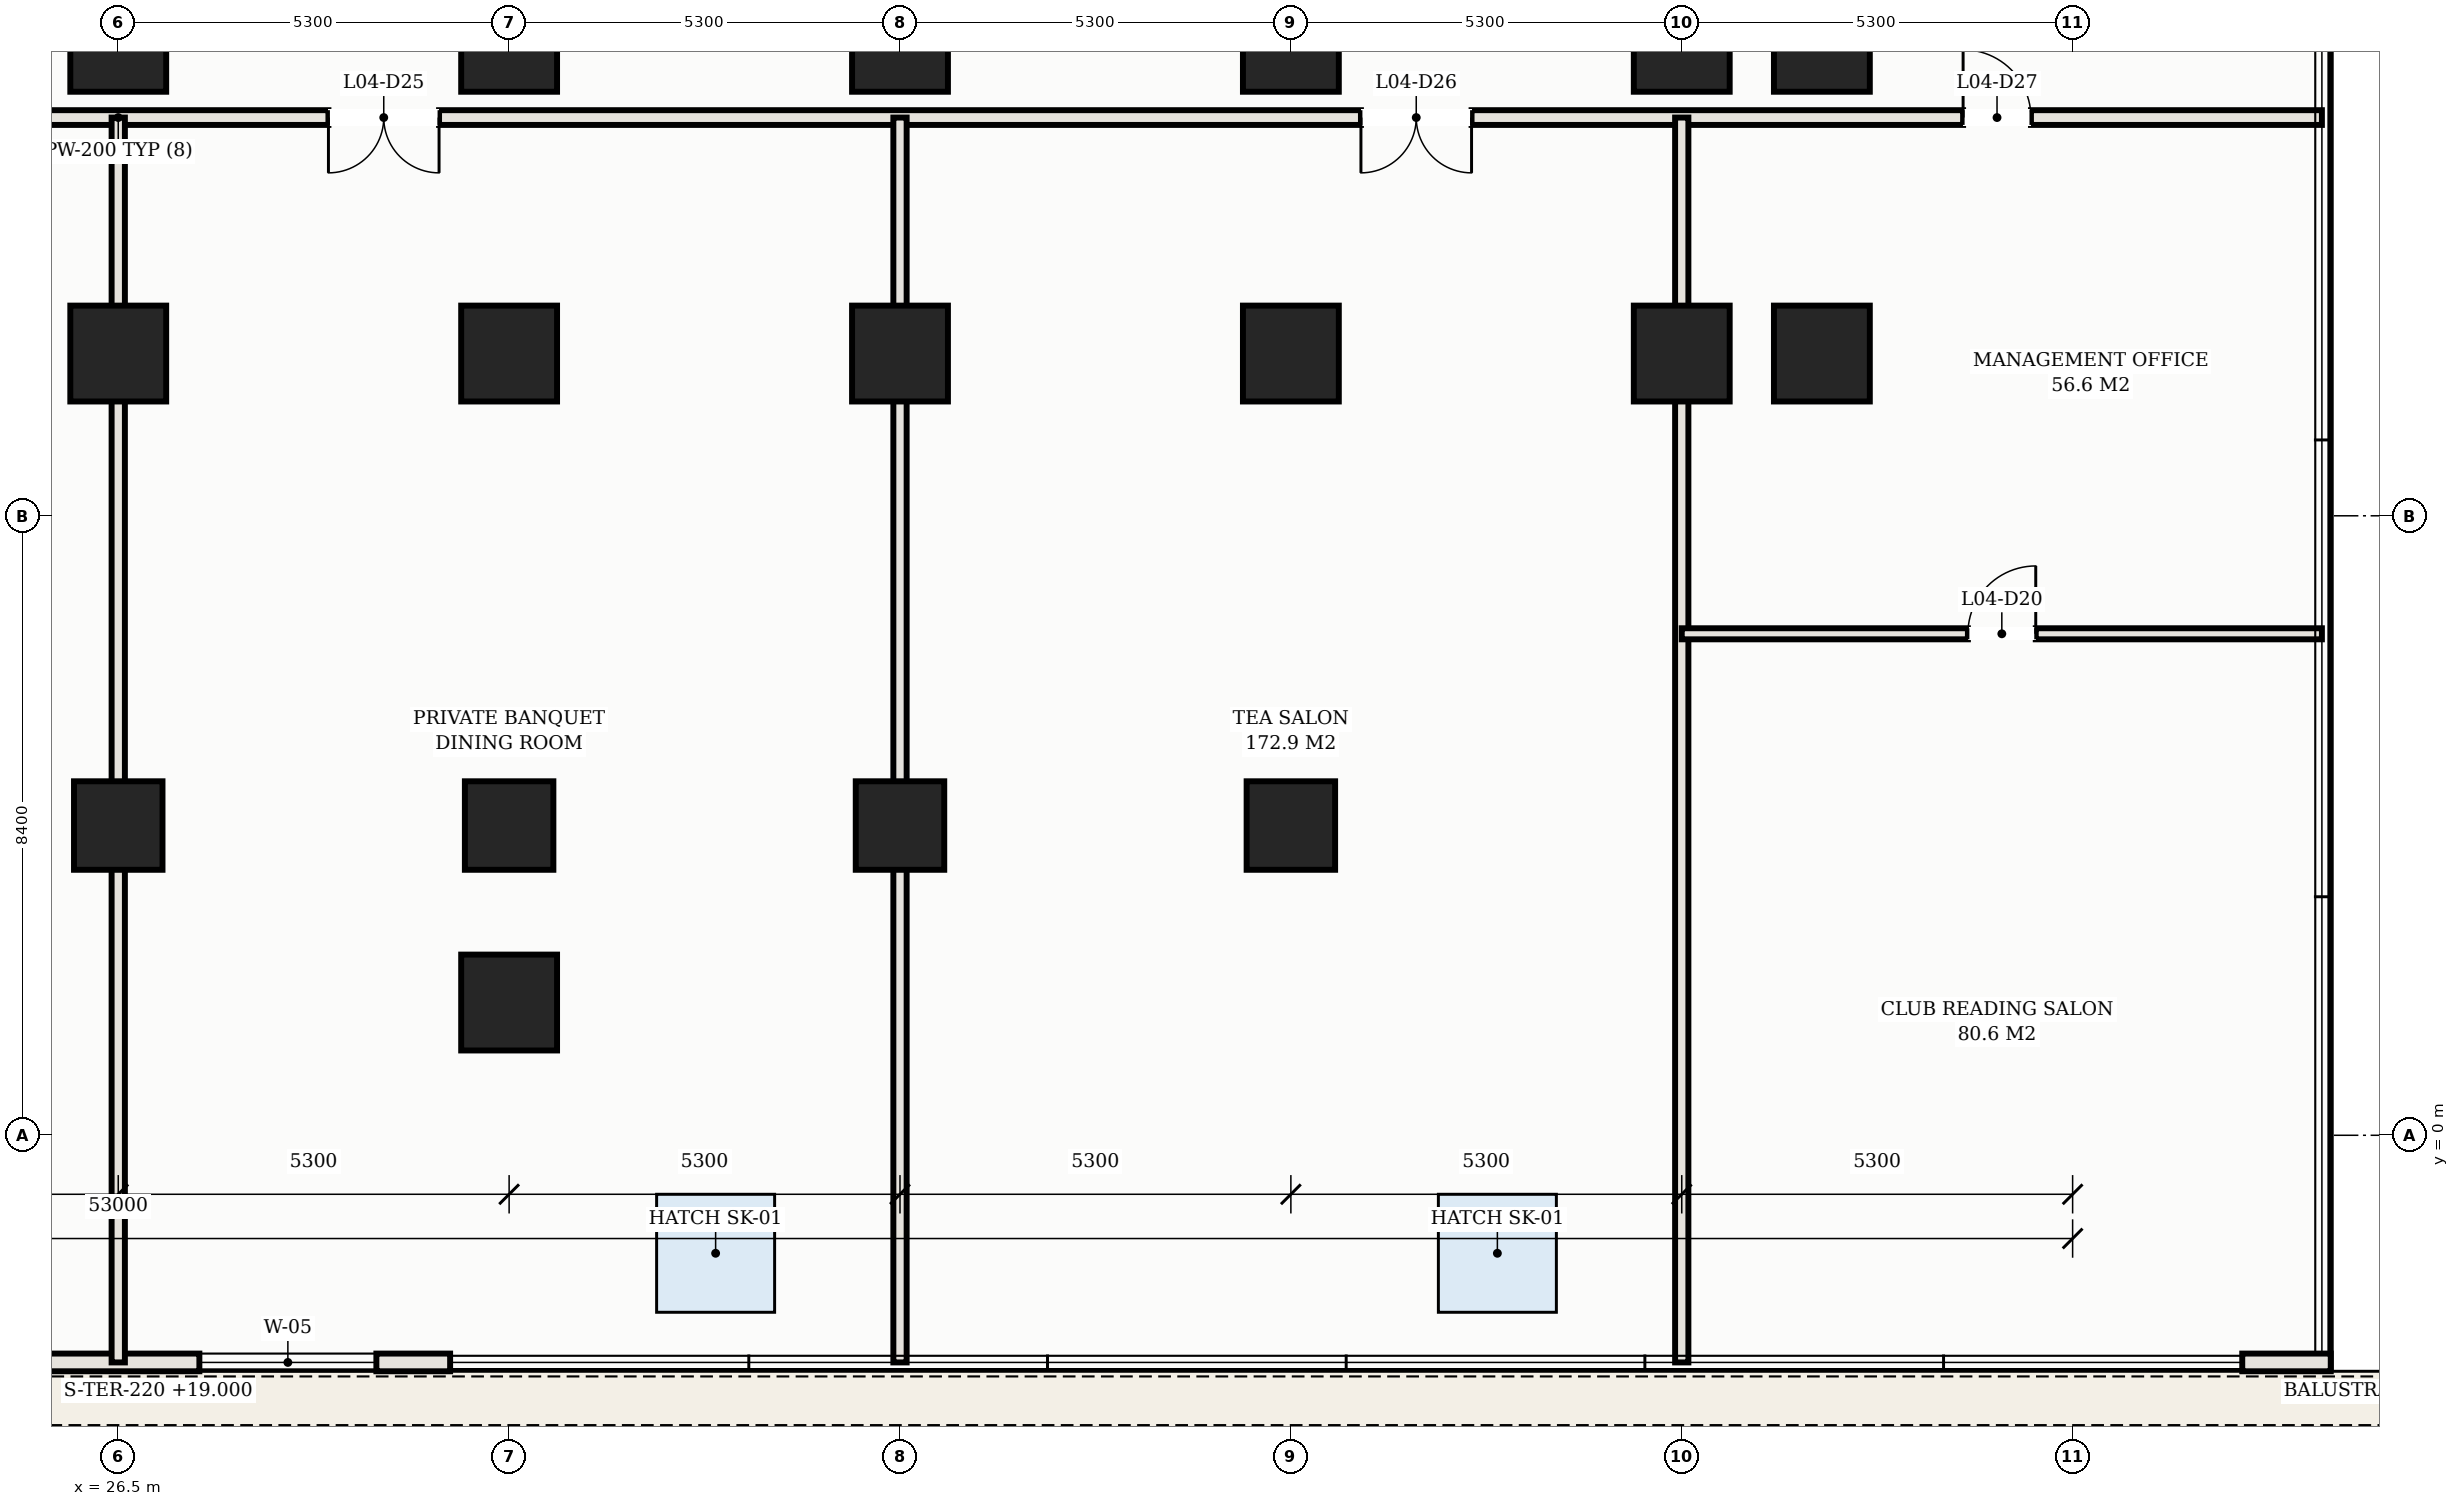
"""IFC4 building model, lengths in metres.
Left out: names, types, materials, properties, quantities, classifications, styles, units other than length and angle.
Written with IfcOpenShell. Run it as: python <this file> out.ifc"""

import sys

from ifc_helpers import new_model, si_unit, direction, frame, frame_2d, origin, origin_2d, place, context, subcontext, project, spatial, rectangle, hollow_rectangle, extrude, element, fill, save


model = new_model("IFC4")
c1 = context("Model", 3, precision=1e-05, world=origin(), true_north=direction((0.0, 1.0)))
c2 = subcontext(c1, "Body", "Model", "MODEL_VIEW")
j1 = project(units=[si_unit("LENGTHUNIT", "METRE"), si_unit("PLANEANGLEUNIT", "RADIAN")], contexts=[c1])
p1 = place(None, origin())
s1 = spatial("IfcSite", under=j1, at=p1, CompositionType="ELEMENT")
p2 = place(p1, origin())
s2 = spatial("IfcBuilding", under=s1, at=p2, CompositionType="ELEMENT")
p3 = place(p2, frame((0.0, 0.0, 19.0)))
s3 = spatial("IfcBuildingStorey", under=s2, at=p3, CompositionType="ELEMENT", Elevation=19.0)
for number, where, z_axis, x_axis in (
    (1, (31.8, 1.8, 0.0), (0.0, 0.0, 1.0), (1.0, 0.0, 0.0)),
    (2, (26.5, 14.8, 0.0), (0.0, 0.0, 1.0), (1.0, 0.0, 0.0)),
):
    element("IfcColumn", number, at=place(p3, frame(where, z_axis=z_axis, x_axis=x_axis)), inside=s3, PredefinedType="COLUMN", context=c2, shape_type="SweptSolid", body=[
        extrude(hollow_rectangle(XDim=1.3, YDim=1.3, WallThickness=0.042, at=origin_2d()), origin(), (0.0, 0.0, 1.0), 5.2),
    ])
p4 = place(p3, frame((26.5, 4.2, 0.0), z_axis=(0.0, 0.0, 1.0), x_axis=(1.0, 0.0, 0.0)))
e3 = element("IfcColumn", 3, at=p4, inside=s3, PredefinedType="COLUMN", context=c2, shape_type="SweptSolid", body=[
    extrude(hollow_rectangle(XDim=1.2, YDim=1.2, WallThickness=0.04, at=origin_2d()), origin(), (0.0, 0.0, 1.0), 5.2),
])
for number, where, z_axis, x_axis in (
    (4, (26.5, 10.6, 0.0), (0.0, 0.0, 1.0), (1.0, 0.0, 0.0)),
    (5, (31.8, 14.8, 0.0), (0.0, 0.0, 1.0), (1.0, 0.0, 0.0)),
):
    element("IfcColumn", number, at=place(p3, frame(where, z_axis=z_axis, x_axis=x_axis)), inside=s3, PredefinedType="COLUMN", context=c2, shape_type="SweptSolid", body=[
        extrude(hollow_rectangle(XDim=1.3, YDim=1.3, WallThickness=0.042, at=origin_2d()), origin(), (0.0, 0.0, 1.0), 5.2),
    ])
p5 = place(p3, frame((31.8, 4.2, 0.0), z_axis=(0.0, 0.0, 1.0), x_axis=(1.0, 0.0, 0.0)))
e6 = element("IfcColumn", 6, at=p5, inside=s3, PredefinedType="COLUMN", context=c2, shape_type="SweptSolid", body=[
    extrude(hollow_rectangle(XDim=1.2, YDim=1.2, WallThickness=0.04, at=origin_2d()), origin(), (0.0, 0.0, 1.0), 5.2),
])
for number, where, z_axis, x_axis in (
    (7, (31.8, 10.6, 0.0), (0.0, 0.0, 1.0), (1.0, 0.0, 0.0)),
    (8, (37.1, 14.8, 0.0), (0.0, 0.0, 1.0), (1.0, 0.0, 0.0)),
):
    element("IfcColumn", number, at=place(p3, frame(where, z_axis=z_axis, x_axis=x_axis)), inside=s3, PredefinedType="COLUMN", context=c2, shape_type="SweptSolid", body=[
        extrude(hollow_rectangle(XDim=1.3, YDim=1.3, WallThickness=0.042, at=origin_2d()), origin(), (0.0, 0.0, 1.0), 5.2),
    ])
p6 = place(p3, frame((37.1, 4.2, 0.0), z_axis=(0.0, 0.0, 1.0), x_axis=(1.0, 0.0, 0.0)))
e9 = element("IfcColumn", 9, at=p6, inside=s3, PredefinedType="COLUMN", context=c2, shape_type="SweptSolid", body=[
    extrude(hollow_rectangle(XDim=1.2, YDim=1.2, WallThickness=0.04, at=origin_2d()), origin(), (0.0, 0.0, 1.0), 5.2),
])
for number, where, z_axis, x_axis in (
    (10, (37.1, 10.6, 0.0), (0.0, 0.0, 1.0), (1.0, 0.0, 0.0)),
    (11, (42.4, 14.8, 0.0), (0.0, 0.0, 1.0), (1.0, 0.0, 0.0)),
):
    element("IfcColumn", number, at=place(p3, frame(where, z_axis=z_axis, x_axis=x_axis)), inside=s3, PredefinedType="COLUMN", context=c2, shape_type="SweptSolid", body=[
        extrude(hollow_rectangle(XDim=1.3, YDim=1.3, WallThickness=0.042, at=origin_2d()), origin(), (0.0, 0.0, 1.0), 5.2),
    ])
p7 = place(p3, frame((42.4, 4.2, 0.0), z_axis=(0.0, 0.0, 1.0), x_axis=(1.0, 0.0, 0.0)))
e12 = element("IfcColumn", 12, at=p7, inside=s3, PredefinedType="COLUMN", context=c2, shape_type="SweptSolid", body=[
    extrude(hollow_rectangle(XDim=1.2, YDim=1.2, WallThickness=0.04, at=origin_2d()), origin(), (0.0, 0.0, 1.0), 5.2),
])
for number, where, z_axis, x_axis in (
    (13, (42.4, 10.6, 0.0), (0.0, 0.0, 1.0), (1.0, 0.0, 0.0)),
    (14, (47.7, 10.6, 0.0), (0.0, 0.0, 1.0), (1.0, 0.0, 0.0)),
    (15, (47.7, 14.8, 0.0), (0.0, 0.0, 1.0), (1.0, 0.0, 0.0)),
    (16, (49.6, 10.6, 0.0), (0.0, 0.0, 1.0), (1.0, 0.0, 0.0)),
    (17, (49.6, 14.8, 0.0), (0.0, 0.0, 1.0), (1.0, 0.0, 0.0)),
):
    element("IfcColumn", number, at=place(p3, frame(where, z_axis=z_axis, x_axis=x_axis)), inside=s3, PredefinedType="COLUMN", context=c2, shape_type="SweptSolid", body=[
        extrude(hollow_rectangle(XDim=1.3, YDim=1.3, WallThickness=0.042, at=origin_2d()), origin(), (0.0, 0.0, 1.0), 5.2),
    ])
p8 = place(p3, frame((22.0, -3.08, 0.0), z_axis=(0.0, 0.0, 1.0), x_axis=(1.0, 0.0, 0.0)))
e18 = element("IfcWall", 18, at=p8, inside=s3, PredefinedType="SOLIDWALL", context=c2, shape_type="SweptSolid", body=[
    extrude(rectangle(XDim=9.0, YDim=0.24, at=frame_2d((4.5, 0.0))), origin(), (0.0, 0.0, 1.0), 4.86),
])
p9 = place(p8, frame((1.6, 0.0, 0.0)))
e19 = element("IfcOpeningElement", 19, at=p9, cuts=e18, PredefinedType="OPENING", context=c2, shape_type="SweptSolid", body=[
    extrude(rectangle(XDim=1.6, YDim=2.25, at=frame_2d((0.8, 1.125))), frame((0.0, 0.13, 0.0), z_axis=(0.0, -1.0, 0.0), x_axis=(1.0, 0.0, 0.0)), (0.0, 0.0, 1.0), 0.26),
])
p10 = place(p8, frame((5.6, 0.0, 0.75)))
e20 = element("IfcOpeningElement", 20, at=p10, cuts=e18, PredefinedType="OPENING", context=c2, shape_type="SweptSolid", body=[
    extrude(rectangle(XDim=2.4, YDim=2.0, at=frame_2d((1.2, 1.0))), frame((0.0, 0.13, 0.0), z_axis=(0.0, -1.0, 0.0), x_axis=(1.0, 0.0, 0.0)), (0.0, 0.0, 1.0), 0.26),
])
p11 = place(p3, frame((55.3, -3.08, 0.0), z_axis=(0.0, 0.0, 1.0), x_axis=(1.0, 0.0, 0.0)))
e21 = element("IfcWall", 21, at=p11, inside=s3, PredefinedType="SOLIDWALL", context=c2, shape_type="SweptSolid", body=[
    extrude(rectangle(XDim=1.2, YDim=0.24, at=frame_2d((0.6, 0.0))), origin(), (0.0, 0.0, 1.0), 4.86),
])
p12 = place(p3, frame((-3.38, 13.8, 0.0), z_axis=(0.0, 0.0, 1.0), x_axis=(1.0, 0.0, 0.0)))
e22 = element("IfcWall", 22, at=p12, inside=s3, PredefinedType="PARTITIONING", context=c2, shape_type="SweptSolid", body=[
    extrude(rectangle(XDim=59.76, YDim=0.2, at=frame_2d((29.88, 0.0))), origin(), (0.0, 0.0, 1.0), 4.86),
])
p13 = place(p12, frame((4.595, 0.0, 0.0)))
e23 = element("IfcOpeningElement", 23, at=p13, cuts=e22, PredefinedType="OPENING", context=c2, shape_type="SweptSolid", body=[
    extrude(rectangle(XDim=0.92, YDim=2.15, at=frame_2d((0.46, 1.075))), frame((0.0, 0.11, 0.0), z_axis=(0.0, -1.0, 0.0), x_axis=(1.0, 0.0, 0.0)), (0.0, 0.0, 1.0), 0.22),
])
p14 = place(p12, frame((10.87, 0.0, 0.0)))
e24 = element("IfcOpeningElement", 24, at=p14, cuts=e22, PredefinedType="OPENING", context=c2, shape_type="SweptSolid", body=[
    extrude(rectangle(XDim=0.92, YDim=2.15, at=frame_2d((0.46, 1.075))), frame((0.0, 0.11, 0.0), z_axis=(0.0, -1.0, 0.0), x_axis=(1.0, 0.0, 0.0)), (0.0, 0.0, 1.0), 0.22),
])
p15 = place(p12, frame((16.17, 0.0, 0.0)))
e25 = element("IfcOpeningElement", 25, at=p15, cuts=e22, PredefinedType="OPENING", context=c2, shape_type="SweptSolid", body=[
    extrude(rectangle(XDim=0.92, YDim=2.15, at=frame_2d((0.46, 1.075))), frame((0.0, 0.11, 0.0), z_axis=(0.0, -1.0, 0.0), x_axis=(1.0, 0.0, 0.0)), (0.0, 0.0, 1.0), 0.22),
])
p16 = place(p12, frame((25.53, 0.0, 0.0)))
e26 = element("IfcOpeningElement", 26, at=p16, cuts=e22, PredefinedType="OPENING", context=c2, shape_type="SweptSolid", body=[
    extrude(rectangle(XDim=1.5, YDim=2.25, at=frame_2d((0.75, 1.125))), frame((0.0, 0.11, 0.0), z_axis=(0.0, -1.0, 0.0), x_axis=(1.0, 0.0, 0.0)), (0.0, 0.0, 1.0), 0.22),
])
p17 = place(p12, frame((32.73, 0.0, 0.0)))
e27 = element("IfcOpeningElement", 27, at=p17, cuts=e22, PredefinedType="OPENING", context=c2, shape_type="SweptSolid", body=[
    extrude(rectangle(XDim=1.5, YDim=2.25, at=frame_2d((0.75, 1.125))), frame((0.0, 0.11, 0.0), z_axis=(0.0, -1.0, 0.0), x_axis=(1.0, 0.0, 0.0)), (0.0, 0.0, 1.0), 0.22),
])
p18 = place(p12, frame((46.73, 0.0, 0.0)))
e28 = element("IfcOpeningElement", 28, at=p18, cuts=e22, PredefinedType="OPENING", context=c2, shape_type="SweptSolid", body=[
    extrude(rectangle(XDim=1.5, YDim=2.25, at=frame_2d((0.75, 1.125))), frame((0.0, 0.11, 0.0), z_axis=(0.0, -1.0, 0.0), x_axis=(1.0, 0.0, 0.0)), (0.0, 0.0, 1.0), 0.22),
])
p19 = place(p12, frame((54.895, 0.0, 0.0)))
e29 = element("IfcOpeningElement", 29, at=p19, cuts=e22, PredefinedType="OPENING", context=c2, shape_type="SweptSolid", body=[
    extrude(rectangle(XDim=0.92, YDim=2.15, at=frame_2d((0.46, 1.075))), frame((0.0, 0.11, 0.0), z_axis=(0.0, -1.0, 0.0), x_axis=(1.0, 0.0, 0.0)), (0.0, 0.0, 1.0), 0.22),
])
for number, where, z_axis, x_axis in (
    (30, (26.5, -3.08, 0.0), (0.0, 0.0, 1.0), (0.0, 1.0, 0.0)),
    (31, (37.1, -3.08, 0.0), (0.0, 0.0, 1.0), (0.0, 1.0, 0.0)),
):
    element("IfcWall", number, at=place(p3, frame(where, z_axis=z_axis, x_axis=x_axis)), inside=s3, PredefinedType="PARTITIONING", context=c2, shape_type="SweptSolid", body=[
        extrude(rectangle(XDim=16.88, YDim=0.18, at=frame_2d((8.44, 0.0))), origin(), (0.0, 0.0, 1.0), 3.055),
    ])
p20 = place(p3, frame((47.7, -3.08, 0.0), z_axis=(0.0, 0.0, 1.0), x_axis=(0.0, 1.0, 0.0)))
e32 = element("IfcWall", 32, at=p20, inside=s3, PredefinedType="PARTITIONING", context=c2, shape_type="SweptSolid", body=[
    extrude(rectangle(XDim=16.88, YDim=0.18, at=frame_2d((8.44, 0.0))), origin(), (0.0, 0.0, 1.0), 4.055),
])
p21 = place(p3, frame((47.7, 6.8, 0.0), z_axis=(0.0, 0.0, 1.0), x_axis=(1.0, 0.0, 0.0)))
e33 = element("IfcWall", 33, at=p21, inside=s3, PredefinedType="PARTITIONING", context=c2, shape_type="SweptSolid", body=[
    extrude(rectangle(XDim=8.68, YDim=0.15, at=frame_2d((4.34, 0.0))), origin(), (0.0, 0.0, 1.0), 4.86),
])
p22 = place(p21, frame((3.88, 0.0, 0.0)))
e34 = element("IfcOpeningElement", 34, at=p22, cuts=e33, PredefinedType="OPENING", context=c2, shape_type="SweptSolid", body=[
    extrude(rectangle(XDim=0.92, YDim=2.15, at=frame_2d((0.46, 1.075))), frame((0.0, 0.085, 0.0), z_axis=(0.0, -1.0, 0.0), x_axis=(1.0, 0.0, 0.0)), (0.0, 0.0, 1.0), 0.17),
])
p23 = place(p10, origin())
e35 = element("IfcWindow", 35, at=p23, inside=s3, PartitioningType="SINGLE_PANEL", PredefinedType="WINDOW", context=c2, shape_type="SweptSolid", body=[
    extrude(rectangle(XDim=2.4, YDim=2.0, at=frame_2d((1.2, 1.0))), frame((0.0, 0.03, 0.0), z_axis=(0.0, -1.0, 0.0), x_axis=(1.0, 0.0, 0.0)), (0.0, 0.0, 1.0), 0.06),
])
fill(e20, e35)
p24 = place(p3, frame((0.0, 0.0, -0.26)))
p25 = place(p24, frame((34.6, -1.6, 0.21)))
e36 = element("IfcWindow", 36, at=p25, inside=s3, PartitioningType="SINGLE_PANEL", PredefinedType="SKYLIGHT", context=c2, shape_type="SweptSolid", body=[
    extrude(rectangle(XDim=1.6, YDim=1.6, at=origin_2d()), origin(), (0.0, 0.0, 1.0), 0.05),
])
p26 = place(p24, frame((45.2, -1.6, 0.21)))
e37 = element("IfcWindow", 37, at=p26, inside=s3, PartitioningType="SINGLE_PANEL", PredefinedType="SKYLIGHT", context=c2, shape_type="SweptSolid", body=[
    extrude(rectangle(XDim=1.6, YDim=1.6, at=origin_2d()), origin(), (0.0, 0.0, 1.0), 0.05),
])
p27 = place(p22, origin())
e38 = element("IfcDoor", 38, at=p27, inside=s3, OperationType="SINGLE_SWING_RIGHT", PredefinedType="DOOR", context=c2, shape_type="SweptSolid", body=[
    extrude(rectangle(XDim=0.92, YDim=2.15, at=frame_2d((0.46, 1.075))), frame((0.0, 0.025, 0.0), z_axis=(0.0, -1.0, 0.0), x_axis=(1.0, 0.0, 0.0)), (0.0, 0.0, 1.0), 0.05),
])
fill(e34, e38)
p28 = place(p17, frame((1.5, 0.0, 0.0), z_axis=(0.0, 0.0, 1.0), x_axis=(-1.0, 0.0, 0.0)))
e39 = element("IfcDoor", 39, at=p28, inside=s3, OperationType="DOUBLE_DOOR_SINGLE_SWING", PredefinedType="DOOR", context=c2, shape_type="SweptSolid", body=[
    extrude(rectangle(XDim=1.5, YDim=2.25, at=frame_2d((0.75, 1.125))), frame((0.0, 0.025, 0.0), z_axis=(0.0, -1.0, 0.0), x_axis=(1.0, 0.0, 0.0)), (0.0, 0.0, 1.0), 0.05),
])
fill(e27, e39)
p29 = place(p18, frame((1.5, 0.0, 0.0), z_axis=(0.0, 0.0, 1.0), x_axis=(-1.0, 0.0, 0.0)))
e40 = element("IfcDoor", 40, at=p29, inside=s3, OperationType="DOUBLE_DOOR_SINGLE_SWING", PredefinedType="DOOR", context=c2, shape_type="SweptSolid", body=[
    extrude(rectangle(XDim=1.5, YDim=2.25, at=frame_2d((0.75, 1.125))), frame((0.0, 0.025, 0.0), z_axis=(0.0, -1.0, 0.0), x_axis=(1.0, 0.0, 0.0)), (0.0, 0.0, 1.0), 0.05),
])
fill(e28, e40)
p30 = place(p19, origin())
e41 = element("IfcDoor", 41, at=p30, inside=s3, OperationType="SINGLE_SWING_LEFT", PredefinedType="DOOR", context=c2, shape_type="SweptSolid", body=[
    extrude(rectangle(XDim=0.92, YDim=2.15, at=frame_2d((0.46, 1.075))), frame((0.0, 0.025, 0.0), z_axis=(0.0, -1.0, 0.0), x_axis=(1.0, 0.0, 0.0)), (0.0, 0.0, 1.0), 0.05),
])
fill(e29, e41)
save(model, sys.argv[1])
